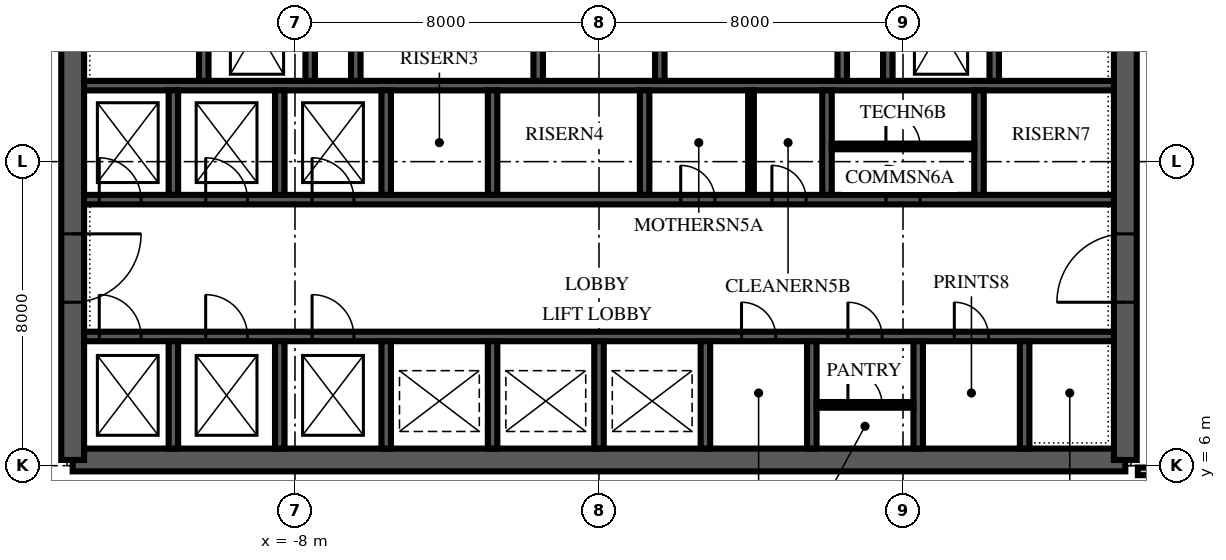
"""IFC4 building model, lengths in metres.
Left out: names, types, materials, properties, quantities, classifications, styles, units other than length and angle.
Written with IfcOpenShell. Run it as: python <this file> out.ifc"""

import sys

from ifc_helpers import new_model, si_unit, direction, frame, frame_2d, origin, place, context, subcontext, project, spatial, polyline, rectangle, outline, extrude, element, fill, save


model = new_model("IFC4")
c1 = context("Model", 3, precision=1e-05, world=origin(), true_north=direction((0.0, 1.0)))
c2 = subcontext(c1, "Body", "Model", "MODEL_VIEW")
j1 = project(units=[si_unit("LENGTHUNIT", "METRE"), si_unit("PLANEANGLEUNIT", "RADIAN")], contexts=[c1])
p1 = place(None, origin())
s1 = spatial("IfcSite", under=j1, at=p1, CompositionType="ELEMENT")
p2 = place(p1, origin())
s2 = spatial("IfcBuilding", under=s1, at=p2, CompositionType="ELEMENT")
p3 = place(p2, frame((0.0, 0.0, 226.0)))
s3 = spatial("IfcBuildingStorey", under=s2, at=p3, CompositionType="ELEMENT", Elevation=226.0)
p4 = place(p3, frame((-13.85, 6.15, 0.0), z_axis=(0.0, 0.0, 1.0), x_axis=(1.0, 0.0, 0.0)))
e1 = element("IfcWall", 1, at=p4, inside=s3, PredefinedType="SHEAR", context=c2, shape_type="SweptSolid", body=[
    extrude(rectangle(XDim=27.7, YDim=0.6, at=frame_2d((13.85, 0.0))), origin(), (0.0, 0.0, 1.0), 4.0),
])
p5 = place(p3, frame((13.85, 6.15, 0.0), z_axis=(0.0, 0.0, 1.0), x_axis=(0.0, 1.0, 0.0)))
e2 = element("IfcWall", 2, at=p5, inside=s3, PredefinedType="SHEAR", context=c2, shape_type="SweptSolid", body=[
    extrude(outline(polyline([(0.0, -0.3), (17.7, -0.3), (17.7, 0.0), (17.4, 0.0), (17.4, 0.3), (0.3, 0.3), (0.3, 0.0), (0.0, 0.0), (0.0, -0.3)])), origin(), (0.0, 0.0, 1.0), 4.0),
])
p6 = place(p5, frame((4.15, 0.0, 0.0)))
e3 = element("IfcOpeningElement", 3, at=p6, cuts=e2, PredefinedType="OPENING", context=c2, shape_type="SweptSolid", body=[
    extrude(rectangle(XDim=1.8, YDim=2.4, at=frame_2d((0.9, 1.2))), frame((0.0, 0.315, 0.0), z_axis=(0.0, -1.0, 0.0), x_axis=(1.0, 0.0, 0.0)), (0.0, 0.0, 1.0), 0.63),
])
p7 = place(p3, frame((-13.85, 23.85, 0.0), z_axis=(0.0, 0.0, 1.0), x_axis=(0.0, -1.0, 0.0)))
e4 = element("IfcWall", 4, at=p7, inside=s3, PredefinedType="SHEAR", context=c2, shape_type="SweptSolid", body=[
    extrude(outline(polyline([(0.0, -0.3), (17.7, -0.3), (17.7, 0.0), (17.4, 0.0), (17.4, 0.3), (0.3, 0.3), (0.3, 0.0), (0.0, 0.0), (0.0, -0.3)])), origin(), (0.0, 0.0, 1.0), 4.0),
])
p8 = place(p7, frame((11.75, 0.0, 0.0)))
e5 = element("IfcOpeningElement", 5, at=p8, cuts=e4, PredefinedType="OPENING", context=c2, shape_type="SweptSolid", body=[
    extrude(rectangle(XDim=1.8, YDim=2.4, at=frame_2d((0.9, 1.2))), frame((0.0, 0.315, 0.0), z_axis=(0.0, -1.0, 0.0), x_axis=(1.0, 0.0, 0.0)), (0.0, 0.0, 1.0), 0.63),
])
p9 = place(p3, frame((-13.55, 9.4, 0.0), z_axis=(0.0, 0.0, 1.0), x_axis=(1.0, 0.0, 0.0)))
e6 = element("IfcWall", 6, at=p9, inside=s3, PredefinedType="SHEAR", context=c2, shape_type="SweptSolid", body=[
    extrude(rectangle(XDim=27.1, YDim=0.25, at=frame_2d((13.55, 0.0))), origin(), (0.0, 0.0, 1.0), 4.0),
])
p10 = place(p9, frame((0.4, 0.0, 0.0)))
e7 = element("IfcOpeningElement", 7, at=p10, cuts=e6, PredefinedType="OPENING", context=c2, shape_type="SweptSolid", body=[
    extrude(rectangle(XDim=1.1, YDim=2.1, at=frame_2d((0.55, 1.05))), frame((0.0, 0.14, 0.0), z_axis=(0.0, -1.0, 0.0), x_axis=(1.0, 0.0, 0.0)), (0.0, 0.0, 1.0), 0.28),
])
p11 = place(p9, frame((3.2, 0.0, 0.0)))
e8 = element("IfcOpeningElement", 8, at=p11, cuts=e6, PredefinedType="OPENING", context=c2, shape_type="SweptSolid", body=[
    extrude(rectangle(XDim=1.1, YDim=2.1, at=frame_2d((0.55, 1.05))), frame((0.0, 0.14, 0.0), z_axis=(0.0, -1.0, 0.0), x_axis=(1.0, 0.0, 0.0)), (0.0, 0.0, 1.0), 0.28),
])
p12 = place(p9, frame((6.0, 0.0, 0.0)))
e9 = element("IfcOpeningElement", 9, at=p12, cuts=e6, PredefinedType="OPENING", context=c2, shape_type="SweptSolid", body=[
    extrude(rectangle(XDim=1.1, YDim=2.1, at=frame_2d((0.55, 1.05))), frame((0.0, 0.14, 0.0), z_axis=(0.0, -1.0, 0.0), x_axis=(1.0, 0.0, 0.0)), (0.0, 0.0, 1.0), 0.28),
])
p13 = place(p9, frame((17.3, 0.0, 0.0)))
e10 = element("IfcOpeningElement", 10, at=p13, cuts=e6, PredefinedType="OPENING", context=c2, shape_type="SweptSolid", body=[
    extrude(rectangle(XDim=0.9, YDim=2.1, at=frame_2d((0.45, 1.05))), frame((0.0, 0.14, 0.0), z_axis=(0.0, -1.0, 0.0), x_axis=(1.0, 0.0, 0.0)), (0.0, 0.0, 1.0), 0.28),
])
p14 = place(p9, frame((20.1, 0.0, 0.0)))
e11 = element("IfcOpeningElement", 11, at=p14, cuts=e6, PredefinedType="OPENING", context=c2, shape_type="SweptSolid", body=[
    extrude(rectangle(XDim=0.9, YDim=2.1, at=frame_2d((0.45, 1.05))), frame((0.0, 0.14, 0.0), z_axis=(0.0, -1.0, 0.0), x_axis=(1.0, 0.0, 0.0)), (0.0, 0.0, 1.0), 0.28),
])
p15 = place(p9, frame((22.9, 0.0, 0.0)))
e12 = element("IfcOpeningElement", 12, at=p15, cuts=e6, PredefinedType="OPENING", context=c2, shape_type="SweptSolid", body=[
    extrude(rectangle(XDim=0.9, YDim=2.1, at=frame_2d((0.45, 1.05))), frame((0.0, 0.14, 0.0), z_axis=(0.0, -1.0, 0.0), x_axis=(1.0, 0.0, 0.0)), (0.0, 0.0, 1.0), 0.28),
])
p16 = place(p3, frame((-13.55, 13.0, 0.0), z_axis=(0.0, 0.0, 1.0), x_axis=(1.0, 0.0, 0.0)))
e13 = element("IfcWall", 13, at=p16, inside=s3, PredefinedType="SHEAR", context=c2, shape_type="SweptSolid", body=[
    extrude(rectangle(XDim=27.1, YDim=0.25, at=frame_2d((13.55, 0.0))), origin(), (0.0, 0.0, 1.0), 4.0),
])
p17 = place(p16, frame((0.4, 0.0, 0.0)))
e14 = element("IfcOpeningElement", 14, at=p17, cuts=e13, PredefinedType="OPENING", context=c2, shape_type="SweptSolid", body=[
    extrude(rectangle(XDim=1.1, YDim=2.1, at=frame_2d((0.55, 1.05))), frame((0.0, 0.14, 0.0), z_axis=(0.0, -1.0, 0.0), x_axis=(1.0, 0.0, 0.0)), (0.0, 0.0, 1.0), 0.28),
])
p18 = place(p16, frame((3.2, 0.0, 0.0)))
e15 = element("IfcOpeningElement", 15, at=p18, cuts=e13, PredefinedType="OPENING", context=c2, shape_type="SweptSolid", body=[
    extrude(rectangle(XDim=1.1, YDim=2.1, at=frame_2d((0.55, 1.05))), frame((0.0, 0.14, 0.0), z_axis=(0.0, -1.0, 0.0), x_axis=(1.0, 0.0, 0.0)), (0.0, 0.0, 1.0), 0.28),
])
p19 = place(p16, frame((6.0, 0.0, 0.0)))
e16 = element("IfcOpeningElement", 16, at=p19, cuts=e13, PredefinedType="OPENING", context=c2, shape_type="SweptSolid", body=[
    extrude(rectangle(XDim=1.1, YDim=2.1, at=frame_2d((0.55, 1.05))), frame((0.0, 0.14, 0.0), z_axis=(0.0, -1.0, 0.0), x_axis=(1.0, 0.0, 0.0)), (0.0, 0.0, 1.0), 0.28),
])
p20 = place(p16, frame((15.7, 0.0, 0.0)))
e17 = element("IfcOpeningElement", 17, at=p20, cuts=e13, PredefinedType="OPENING", context=c2, shape_type="SweptSolid", body=[
    extrude(rectangle(XDim=0.9, YDim=2.1, at=frame_2d((0.45, 1.05))), frame((0.0, 0.14, 0.0), z_axis=(0.0, -1.0, 0.0), x_axis=(1.0, 0.0, 0.0)), (0.0, 0.0, 1.0), 0.28),
])
p21 = place(p16, frame((18.1, 0.0, 0.0)))
e18 = element("IfcOpeningElement", 18, at=p21, cuts=e13, PredefinedType="OPENING", context=c2, shape_type="SweptSolid", body=[
    extrude(rectangle(XDim=0.9, YDim=2.1, at=frame_2d((0.45, 1.05))), frame((0.0, 0.14, 0.0), z_axis=(0.0, -1.0, 0.0), x_axis=(1.0, 0.0, 0.0)), (0.0, 0.0, 1.0), 0.28),
])
p22 = place(p16, frame((21.1, 0.0, 0.0)))
e19 = element("IfcOpeningElement", 19, at=p22, cuts=e13, PredefinedType="OPENING", context=c2, shape_type="SweptSolid", body=[
    extrude(rectangle(XDim=0.9, YDim=2.1, at=frame_2d((0.45, 1.05))), frame((0.0, 0.14, 0.0), z_axis=(0.0, -1.0, 0.0), x_axis=(1.0, 0.0, 0.0)), (0.0, 0.0, 1.0), 0.28),
])
p23 = place(p3, frame((-13.55, 16.0, 0.0), z_axis=(0.0, 0.0, 1.0), x_axis=(1.0, 0.0, 0.0)))
e20 = element("IfcWall", 20, at=p23, inside=s3, PredefinedType="SHEAR", context=c2, shape_type="SweptSolid", body=[
    extrude(rectangle(XDim=27.1, YDim=0.25, at=frame_2d((13.55, 0.0))), origin(), (0.0, 0.0, 1.0), 4.0),
])
for number, where, z_axis, x_axis in (
    (21, (-11.2, 6.45, 0.0), (0.0, 0.0, 1.0), (0.0, 1.0, 0.0)),
    (22, (-8.4, 6.45, 0.0), (0.0, 0.0, 1.0), (0.0, 1.0, 0.0)),
    (23, (-5.6, 6.45, 0.0), (0.0, 0.0, 1.0), (0.0, 1.0, 0.0)),
    (24, (-2.8, 6.45, 0.0), (0.0, 0.0, 1.0), (0.0, 1.0, 0.0)),
    (25, (0.0, 6.45, 0.0), (0.0, 0.0, 1.0), (0.0, 1.0, 0.0)),
    (26, (2.8, 6.45, 0.0), (0.0, 0.0, 1.0), (0.0, 1.0, 0.0)),
    (27, (5.6, 6.45, 0.0), (0.0, 0.0, 1.0), (0.0, 1.0, 0.0)),
    (28, (8.4, 6.45, 0.0), (0.0, 0.0, 1.0), (0.0, 1.0, 0.0)),
    (29, (11.2, 6.45, 0.0), (0.0, 0.0, 1.0), (0.0, 1.0, 0.0)),
):
    element("IfcWall", number, at=place(p3, frame(where, z_axis=z_axis, x_axis=x_axis)), inside=s3, PredefinedType="SHEAR", context=c2, shape_type="SweptSolid", body=[
        extrude(rectangle(XDim=2.825, YDim=0.25, at=frame_2d((1.413, 0.0))), origin(), (0.0, 0.0, 1.0), 4.0),
    ])
for number, where, z_axis, x_axis in (
    (30, (-11.2, 13.125, 0.0), (0.0, 0.0, 1.0), (0.0, 1.0, 0.0)),
    (31, (-8.4, 13.125, 0.0), (0.0, 0.0, 1.0), (0.0, 1.0, 0.0)),
    (32, (-5.6, 13.125, 0.0), (0.0, 0.0, 1.0), (0.0, 1.0, 0.0)),
    (33, (-2.8, 13.125, 0.0), (0.0, 0.0, 1.0), (0.0, 1.0, 0.0)),
    (34, (1.2, 13.125, 0.0), (0.0, 0.0, 1.0), (0.0, 1.0, 0.0)),
    (35, (6.0, 13.125, 0.0), (0.0, 0.0, 1.0), (0.0, 1.0, 0.0)),
    (36, (10.0, 13.125, 0.0), (0.0, 0.0, 1.0), (0.0, 1.0, 0.0)),
):
    element("IfcWall", number, at=place(p3, frame(where, z_axis=z_axis, x_axis=x_axis)), inside=s3, PredefinedType="SHEAR", context=c2, shape_type="SweptSolid", body=[
        extrude(rectangle(XDim=2.75, YDim=0.25, at=frame_2d((1.375, 0.0))), origin(), (0.0, 0.0, 1.0), 4.0),
    ])
p24 = place(p3, frame((-10.4, 16.125, 0.0), z_axis=(0.0, 0.0, 1.0), x_axis=(0.0, 1.0, 0.0)))
e37 = element("IfcWall", 37, at=p24, inside=s3, PredefinedType="SHEAR", context=c2, shape_type="SweptSolid", body=[
    extrude(rectangle(XDim=7.425, YDim=0.25, at=frame_2d((3.712, 0.0))), origin(), (0.0, 0.0, 1.0), 4.0),
])
p25 = place(p24, frame((6.225, 0.0, 0.0)))
e38 = element("IfcOpeningElement", 38, at=p25, cuts=e37, PredefinedType="OPENING", context=c2, shape_type="SweptSolid", body=[
    extrude(rectangle(XDim=1.0, YDim=2.1, at=frame_2d((0.5, 1.05))), frame((0.0, 0.14, 0.0), z_axis=(0.0, -1.0, 0.0), x_axis=(1.0, 0.0, 0.0)), (0.0, 0.0, 1.0), 0.28),
])
for number, where, z_axis, x_axis in (
    (39, (-6.4, 16.125, 0.0), (0.0, 0.0, 1.0), (0.0, 1.0, 0.0)),
    (40, (-1.6, 16.125, 0.0), (0.0, 0.0, 1.0), (0.0, 1.0, 0.0)),
    (41, (1.6, 16.125, 0.0), (0.0, 0.0, 1.0), (0.0, 1.0, 0.0)),
    (42, (6.4, 16.125, 0.0), (0.0, 0.0, 1.0), (0.0, 1.0, 0.0)),
):
    element("IfcWall", number, at=place(p3, frame(where, z_axis=z_axis, x_axis=x_axis)), inside=s3, PredefinedType="SHEAR", context=c2, shape_type="SweptSolid", body=[
        extrude(rectangle(XDim=7.425, YDim=0.25, at=frame_2d((3.712, 0.0))), origin(), (0.0, 0.0, 1.0), 4.0),
    ])
p26 = place(p3, frame((10.4, 16.125, 0.0), z_axis=(0.0, 0.0, 1.0), x_axis=(0.0, 1.0, 0.0)))
e43 = element("IfcWall", 43, at=p26, inside=s3, PredefinedType="SHEAR", context=c2, shape_type="SweptSolid", body=[
    extrude(rectangle(XDim=7.425, YDim=0.25, at=frame_2d((3.712, 0.0))), origin(), (0.0, 0.0, 1.0), 4.0),
])
p27 = place(p26, frame((6.225, 0.0, 0.0)))
e44 = element("IfcOpeningElement", 44, at=p27, cuts=e43, PredefinedType="OPENING", context=c2, shape_type="SweptSolid", body=[
    extrude(rectangle(XDim=1.0, YDim=2.1, at=frame_2d((0.5, 1.05))), frame((0.0, 0.14, 0.0), z_axis=(0.0, -1.0, 0.0), x_axis=(1.0, 0.0, 0.0)), (0.0, 0.0, 1.0), 0.28),
])
for number, where, z_axis, x_axis in (
    (45, (-7.6, 16.125, 0.0), (0.0, 0.0, 1.0), (0.0, 1.0, 0.0)),
    (46, (7.6, 16.125, 0.0), (0.0, 0.0, 1.0), (0.0, 1.0, 0.0)),
):
    element("IfcWall", number, at=place(p3, frame(where, z_axis=z_axis, x_axis=x_axis)), inside=s3, PredefinedType="SHEAR", context=c2, shape_type="SweptSolid", body=[
        extrude(rectangle(XDim=2.75, YDim=0.25, at=frame_2d((1.375, 0.0))), origin(), (0.0, 0.0, 1.0), 4.0),
    ])
p28 = place(p3, frame((4.0, 13.125, 0.0), z_axis=(0.0, 0.0, 1.0), x_axis=(0.0, 1.0, 0.0)))
e47 = element("IfcWall", 47, at=p28, inside=s3, PredefinedType="PARTITIONING", context=c2, shape_type="SweptSolid", body=[
    extrude(rectangle(XDim=2.75, YDim=0.15, at=frame_2d((1.375, 0.0))), origin(), (0.0, 0.0, 1.0), 3.85),
])
p29 = place(p3, frame((6.125, 14.4, 0.0), z_axis=(0.0, 0.0, 1.0), x_axis=(1.0, 0.0, 0.0)))
e48 = element("IfcWall", 48, at=p29, inside=s3, PredefinedType="PARTITIONING", context=c2, shape_type="SweptSolid", body=[
    extrude(rectangle(XDim=3.75, YDim=0.15, at=frame_2d((1.875, 0.0))), origin(), (0.0, 0.0, 1.0), 3.85),
])
p30 = place(p29, frame((1.425, 0.0, 0.0)))
e49 = element("IfcOpeningElement", 49, at=p30, cuts=e48, PredefinedType="OPENING", context=c2, shape_type="SweptSolid", body=[
    extrude(rectangle(XDim=0.9, YDim=2.1, at=frame_2d((0.45, 1.05))), frame((0.0, 0.09, 0.0), z_axis=(0.0, -1.0, 0.0), x_axis=(1.0, 0.0, 0.0)), (0.0, 0.0, 1.0), 0.18),
])
p31 = place(p3, frame((5.725, 7.6, 0.0), z_axis=(0.0, 0.0, 1.0), x_axis=(1.0, 0.0, 0.0)))
e50 = element("IfcWall", 50, at=p31, inside=s3, PredefinedType="PARTITIONING", context=c2, shape_type="SweptSolid", body=[
    extrude(rectangle(XDim=2.55, YDim=0.15, at=frame_2d((1.275, 0.0))), origin(), (0.0, 0.0, 1.0), 3.85),
])
p32 = place(p31, frame((0.825, 0.0, 0.0)))
e51 = element("IfcOpeningElement", 51, at=p32, cuts=e50, PredefinedType="OPENING", context=c2, shape_type="SweptSolid", body=[
    extrude(rectangle(XDim=0.9, YDim=2.1, at=frame_2d((0.45, 1.05))), frame((0.0, 0.09, 0.0), z_axis=(0.0, -1.0, 0.0), x_axis=(1.0, 0.0, 0.0)), (0.0, 0.0, 1.0), 0.18),
])
p33 = place(p3, frame((14.18, 5.85, 0.0), z_axis=(0.0, 0.0, 1.0), x_axis=(1.0, 0.0, 0.0)))
e52 = element("IfcWall", 52, at=p33, inside=s3, PredefinedType="PARTITIONING", context=c2, shape_type="SweptSolid", body=[
    extrude(rectangle(XDim=2.02, YDim=0.2, at=frame_2d((1.01, 0.0))), origin(), (0.0, 0.0, 1.0), 3.85),
])
p34 = place(p6, origin())
e53 = element("IfcDoor", 53, at=p34, inside=s3, OperationType="DOUBLE_DOOR_SINGLE_SWING", PredefinedType="DOOR", context=c2, shape_type="SweptSolid", body=[
    extrude(rectangle(XDim=1.8, YDim=2.4, at=frame_2d((0.9, 1.2))), frame((0.0, 0.3, 0.0), z_axis=(0.0, -1.0, 0.0), x_axis=(1.0, 0.0, 0.0)), (0.0, 0.0, 1.0), 0.6),
])
fill(e3, e53)
p35 = place(p8, origin())
e54 = element("IfcDoor", 54, at=p35, inside=s3, OperationType="DOUBLE_DOOR_SINGLE_SWING", PredefinedType="DOOR", context=c2, shape_type="SweptSolid", body=[
    extrude(rectangle(XDim=1.8, YDim=2.4, at=frame_2d((0.9, 1.2))), frame((0.0, 0.3, 0.0), z_axis=(0.0, -1.0, 0.0), x_axis=(1.0, 0.0, 0.0)), (0.0, 0.0, 1.0), 0.6),
])
fill(e5, e54)
p36 = place(p10, origin())
e55 = element("IfcDoor", 55, at=p36, inside=s3, OperationType="SLIDING_TO_LEFT", PredefinedType="DOOR", context=c2, shape_type="SweptSolid", body=[
    extrude(rectangle(XDim=1.1, YDim=2.1, at=frame_2d((0.55, 1.05))), frame((0.0, 0.125, 0.0), z_axis=(0.0, -1.0, 0.0), x_axis=(1.0, 0.0, 0.0)), (0.0, 0.0, 1.0), 0.25),
])
fill(e7, e55)
p37 = place(p11, origin())
e56 = element("IfcDoor", 56, at=p37, inside=s3, OperationType="SLIDING_TO_LEFT", PredefinedType="DOOR", context=c2, shape_type="SweptSolid", body=[
    extrude(rectangle(XDim=1.1, YDim=2.1, at=frame_2d((0.55, 1.05))), frame((0.0, 0.125, 0.0), z_axis=(0.0, -1.0, 0.0), x_axis=(1.0, 0.0, 0.0)), (0.0, 0.0, 1.0), 0.25),
])
fill(e8, e56)
p38 = place(p12, origin())
e57 = element("IfcDoor", 57, at=p38, inside=s3, OperationType="SLIDING_TO_LEFT", PredefinedType="DOOR", context=c2, shape_type="SweptSolid", body=[
    extrude(rectangle(XDim=1.1, YDim=2.1, at=frame_2d((0.55, 1.05))), frame((0.0, 0.125, 0.0), z_axis=(0.0, -1.0, 0.0), x_axis=(1.0, 0.0, 0.0)), (0.0, 0.0, 1.0), 0.25),
])
fill(e9, e57)
p39 = place(p17, origin())
e58 = element("IfcDoor", 58, at=p39, inside=s3, OperationType="SLIDING_TO_LEFT", PredefinedType="DOOR", context=c2, shape_type="SweptSolid", body=[
    extrude(rectangle(XDim=1.1, YDim=2.1, at=frame_2d((0.55, 1.05))), frame((0.0, 0.125, 0.0), z_axis=(0.0, -1.0, 0.0), x_axis=(1.0, 0.0, 0.0)), (0.0, 0.0, 1.0), 0.25),
])
fill(e14, e58)
p40 = place(p18, origin())
e59 = element("IfcDoor", 59, at=p40, inside=s3, OperationType="SLIDING_TO_LEFT", PredefinedType="DOOR", context=c2, shape_type="SweptSolid", body=[
    extrude(rectangle(XDim=1.1, YDim=2.1, at=frame_2d((0.55, 1.05))), frame((0.0, 0.125, 0.0), z_axis=(0.0, -1.0, 0.0), x_axis=(1.0, 0.0, 0.0)), (0.0, 0.0, 1.0), 0.25),
])
fill(e15, e59)
p41 = place(p19, origin())
e60 = element("IfcDoor", 60, at=p41, inside=s3, OperationType="SLIDING_TO_LEFT", PredefinedType="DOOR", context=c2, shape_type="SweptSolid", body=[
    extrude(rectangle(XDim=1.1, YDim=2.1, at=frame_2d((0.55, 1.05))), frame((0.0, 0.125, 0.0), z_axis=(0.0, -1.0, 0.0), x_axis=(1.0, 0.0, 0.0)), (0.0, 0.0, 1.0), 0.25),
])
fill(e16, e60)
p42 = place(p20, origin())
e61 = element("IfcDoor", 61, at=p42, inside=s3, OperationType="SINGLE_SWING_LEFT", PredefinedType="DOOR", context=c2, shape_type="SweptSolid", body=[
    extrude(rectangle(XDim=0.9, YDim=2.1, at=frame_2d((0.45, 1.05))), frame((0.0, 0.125, 0.0), z_axis=(0.0, -1.0, 0.0), x_axis=(1.0, 0.0, 0.0)), (0.0, 0.0, 1.0), 0.25),
])
fill(e17, e61)
p43 = place(p21, origin())
e62 = element("IfcDoor", 62, at=p43, inside=s3, OperationType="SINGLE_SWING_LEFT", PredefinedType="DOOR", context=c2, shape_type="SweptSolid", body=[
    extrude(rectangle(XDim=0.9, YDim=2.1, at=frame_2d((0.45, 1.05))), frame((0.0, 0.125, 0.0), z_axis=(0.0, -1.0, 0.0), x_axis=(1.0, 0.0, 0.0)), (0.0, 0.0, 1.0), 0.25),
])
fill(e18, e62)
p44 = place(p22, origin())
e63 = element("IfcDoor", 63, at=p44, inside=s3, OperationType="SINGLE_SWING_LEFT", PredefinedType="DOOR", context=c2, shape_type="SweptSolid", body=[
    extrude(rectangle(XDim=0.9, YDim=2.1, at=frame_2d((0.45, 1.05))), frame((0.0, 0.125, 0.0), z_axis=(0.0, -1.0, 0.0), x_axis=(1.0, 0.0, 0.0)), (0.0, 0.0, 1.0), 0.25),
])
fill(e19, e63)
p45 = place(p30, origin())
e64 = element("IfcDoor", 64, at=p45, inside=s3, OperationType="SINGLE_SWING_LEFT", PredefinedType="DOOR", context=c2, shape_type="SweptSolid", body=[
    extrude(rectangle(XDim=0.9, YDim=2.1, at=frame_2d((0.45, 1.05))), frame((0.0, 0.075, 0.0), z_axis=(0.0, -1.0, 0.0), x_axis=(1.0, 0.0, 0.0)), (0.0, 0.0, 1.0), 0.149),
])
fill(e49, e64)
p46 = place(p13, origin())
e65 = element("IfcDoor", 65, at=p46, inside=s3, OperationType="SINGLE_SWING_LEFT", PredefinedType="DOOR", context=c2, shape_type="SweptSolid", body=[
    extrude(rectangle(XDim=0.9, YDim=2.1, at=frame_2d((0.45, 1.05))), frame((0.0, 0.125, 0.0), z_axis=(0.0, -1.0, 0.0), x_axis=(1.0, 0.0, 0.0)), (0.0, 0.0, 1.0), 0.25),
])
fill(e10, e65)
p47 = place(p14, origin())
e66 = element("IfcDoor", 66, at=p47, inside=s3, OperationType="SINGLE_SWING_LEFT", PredefinedType="DOOR", context=c2, shape_type="SweptSolid", body=[
    extrude(rectangle(XDim=0.9, YDim=2.1, at=frame_2d((0.45, 1.05))), frame((0.0, 0.125, 0.0), z_axis=(0.0, -1.0, 0.0), x_axis=(1.0, 0.0, 0.0)), (0.0, 0.0, 1.0), 0.25),
])
fill(e11, e66)
p48 = place(p32, origin())
e67 = element("IfcDoor", 67, at=p48, inside=s3, OperationType="SINGLE_SWING_LEFT", PredefinedType="DOOR", context=c2, shape_type="SweptSolid", body=[
    extrude(rectangle(XDim=0.9, YDim=2.1, at=frame_2d((0.45, 1.05))), frame((0.0, 0.075, 0.0), z_axis=(0.0, -1.0, 0.0), x_axis=(1.0, 0.0, 0.0)), (0.0, 0.0, 1.0), 0.149),
])
fill(e51, e67)
p49 = place(p15, origin())
e68 = element("IfcDoor", 68, at=p49, inside=s3, OperationType="SINGLE_SWING_LEFT", PredefinedType="DOOR", context=c2, shape_type="SweptSolid", body=[
    extrude(rectangle(XDim=0.9, YDim=2.1, at=frame_2d((0.45, 1.05))), frame((0.0, 0.125, 0.0), z_axis=(0.0, -1.0, 0.0), x_axis=(1.0, 0.0, 0.0)), (0.0, 0.0, 1.0), 0.25),
])
fill(e12, e68)
save(model, sys.argv[1])
